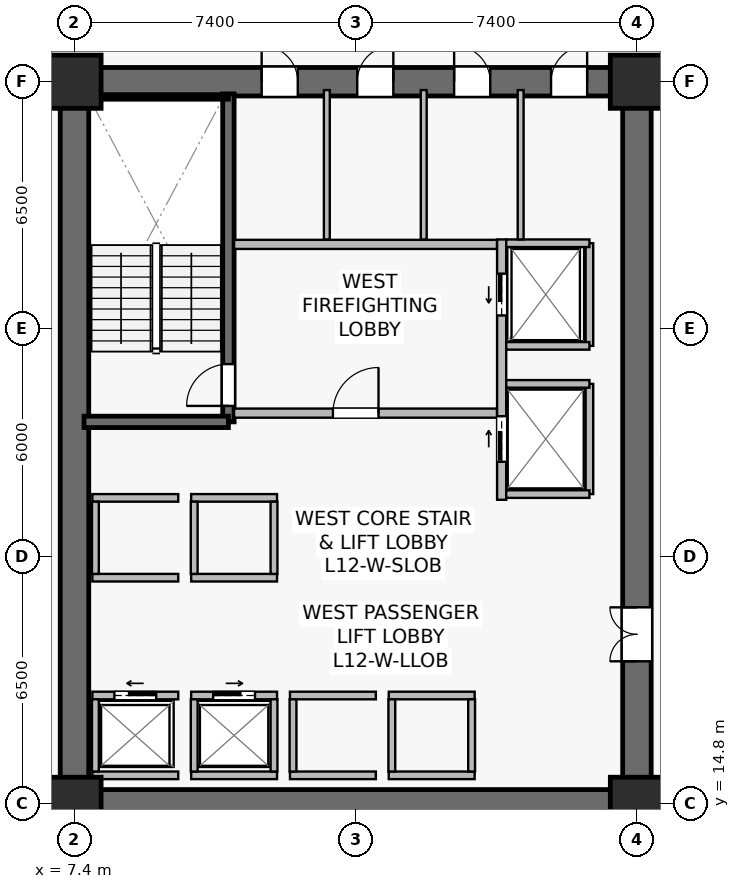
"""IFC4 building model, lengths in metres.
Left out: names, types, materials, properties, quantities, classifications, styles, units other than length and angle.
Written with IfcOpenShell. Run it as: python <this file> out.ifc"""

import sys

from ifc_helpers import new_model, si_unit, direction, frame, frame_2d, origin, origin_2d, place, context, subcontext, project, spatial, rectangle, extrude, source, transform, mapped, element, fill, save


model = new_model("IFC4")
c1 = context("Model", 3, precision=1e-05, world=origin(), true_north=direction((0.0, 1.0)))
c2 = subcontext(c1, "Body", "Model", "MODEL_VIEW")
j1 = project(units=[si_unit("LENGTHUNIT", "METRE"), si_unit("PLANEANGLEUNIT", "RADIAN")], contexts=[c1])
p1 = place(None, origin())
s1 = spatial("IfcSite", under=j1, at=p1, CompositionType="ELEMENT")
p2 = place(p1, origin())
s2 = spatial("IfcBuilding", under=s1, at=p2, CompositionType="ELEMENT")
p3 = place(p2, frame((0.0, 0.0, 49.8)))
s3 = spatial("IfcBuildingStorey", under=s2, at=p3, CompositionType="ELEMENT", Elevation=49.8)
p4 = place(p3, frame((7.025, 14.8, 0.0), z_axis=(0.0, 0.0, 1.0), x_axis=(1.0, 0.0, 0.0)))
e1 = element("IfcWall", 1, at=p4, inside=s3, PredefinedType="SHEAR", context=c2, shape_type="SweptSolid", body=[
    extrude(rectangle(XDim=15.55, YDim=0.75, at=frame_2d((7.775, 0.0))), origin(), (0.0, 0.0, 1.0), 3.78),
])
p5 = place(p3, frame((7.025, 33.8, 0.0), z_axis=(0.0, 0.0, 1.0), x_axis=(1.0, 0.0, 0.0)))
e2 = element("IfcWall", 2, at=p5, inside=s3, PredefinedType="SHEAR", context=c2, shape_type="SweptSolid", body=[
    extrude(rectangle(XDim=15.55, YDim=0.75, at=frame_2d((7.775, 0.0))), origin(), (0.0, 0.0, 1.0), 3.78),
])
p6 = place(p5, frame((5.3, 0.0, 0.0)))
e3 = element("IfcOpeningElement", 3, at=p6, cuts=e2, PredefinedType="OPENING", context=c2, shape_type="SweptSolid", body=[
    extrude(rectangle(XDim=0.95, YDim=2.15, at=frame_2d((0.475, 1.075))), frame((0.0, 0.385, 0.0), z_axis=(0.0, -1.0, 0.0), x_axis=(1.0, 0.0, 0.0)), (0.0, 0.0, 1.0), 0.77),
])
p7 = place(p5, frame((7.815, 0.0, 0.0)))
e4 = element("IfcOpeningElement", 4, at=p7, cuts=e2, PredefinedType="OPENING", context=c2, shape_type="SweptSolid", body=[
    extrude(rectangle(XDim=0.95, YDim=2.15, at=frame_2d((0.475, 1.075))), frame((0.0, 0.385, 0.0), z_axis=(0.0, -1.0, 0.0), x_axis=(1.0, 0.0, 0.0)), (0.0, 0.0, 1.0), 0.77),
])
p8 = place(p5, frame((10.365, 0.0, 0.0)))
e5 = element("IfcOpeningElement", 5, at=p8, cuts=e2, PredefinedType="OPENING", context=c2, shape_type="SweptSolid", body=[
    extrude(rectangle(XDim=0.95, YDim=2.15, at=frame_2d((0.475, 1.075))), frame((0.0, 0.385, 0.0), z_axis=(0.0, -1.0, 0.0), x_axis=(1.0, 0.0, 0.0)), (0.0, 0.0, 1.0), 0.77),
])
p9 = place(p5, frame((12.915, 0.0, 0.0)))
e6 = element("IfcOpeningElement", 6, at=p9, cuts=e2, PredefinedType="OPENING", context=c2, shape_type="SweptSolid", body=[
    extrude(rectangle(XDim=0.95, YDim=2.15, at=frame_2d((0.475, 1.075))), frame((0.0, 0.385, 0.0), z_axis=(0.0, -1.0, 0.0), x_axis=(1.0, 0.0, 0.0)), (0.0, 0.0, 1.0), 0.77),
])
p10 = place(p3, frame((7.4, 15.175, 0.0), z_axis=(0.0, 0.0, 1.0), x_axis=(0.0, 1.0, 0.0)))
e7 = element("IfcWall", 7, at=p10, inside=s3, PredefinedType="SHEAR", context=c2, shape_type="SweptSolid", body=[
    extrude(rectangle(XDim=18.25, YDim=0.75, at=frame_2d((9.125, 0.0))), origin(), (0.0, 0.0, 1.0), 3.78),
])
p11 = place(p3, frame((22.2, 15.175, 0.0), z_axis=(0.0, 0.0, 1.0), x_axis=(0.0, 1.0, 0.0)))
e8 = element("IfcWall", 8, at=p11, inside=s3, PredefinedType="SHEAR", context=c2, shape_type="SweptSolid", body=[
    extrude(rectangle(XDim=18.25, YDim=0.75, at=frame_2d((9.125, 0.0))), origin(), (0.0, 0.0, 1.0), 3.78),
])
p12 = place(p11, frame((3.375, 0.0, 0.0)))
e9 = element("IfcOpeningElement", 9, at=p12, cuts=e8, PredefinedType="OPENING", context=c2, shape_type="SweptSolid", body=[
    extrude(rectangle(XDim=1.42, YDim=2.2, at=frame_2d((0.71, 1.1))), frame((0.0, 0.385, 0.0), z_axis=(0.0, -1.0, 0.0), x_axis=(1.0, 0.0, 0.0)), (0.0, 0.0, 1.0), 0.77),
])
p13 = place(p3, frame((11.45, 24.85, 0.0), z_axis=(0.0, 0.0, 1.0), x_axis=(0.0, 1.0, 0.0)))
e10 = element("IfcWall", 10, at=p13, inside=s3, PredefinedType="SHEAR", context=c2, shape_type="SweptSolid", body=[
    extrude(rectangle(XDim=8.63, YDim=0.3, at=frame_2d((4.315, 0.0))), origin(), (0.0, 0.0, 1.0), 3.78),
])
p14 = place(p13, frame((0.42, 0.0, 0.0)))
e11 = element("IfcOpeningElement", 11, at=p14, cuts=e10, PredefinedType="OPENING", context=c2, shape_type="SweptSolid", body=[
    extrude(rectangle(XDim=1.1, YDim=2.15, at=frame_2d((0.55, 1.075))), frame((0.0, 0.16, 0.0), z_axis=(0.0, -1.0, 0.0), x_axis=(1.0, 0.0, 0.0)), (0.0, 0.0, 1.0), 0.32),
])
p15 = place(p3, frame((7.65, 24.85, 0.0), z_axis=(0.0, 0.0, 1.0), x_axis=(1.0, 0.0, 0.0)))
e12 = element("IfcWall", 12, at=p15, inside=s3, PredefinedType="SHEAR", context=c2, shape_type="SweptSolid", body=[
    extrude(rectangle(XDim=3.8, YDim=0.3, at=frame_2d((1.9, 0.0))), origin(), (0.0, 0.0, 1.0), 3.78),
])
p16 = place(p3, frame((7.73, 33.4, 0.0), z_axis=(0.0, 0.0, 1.0), x_axis=(1.0, 0.0, 0.0)))
e13 = element("IfcWall", 13, at=p16, inside=s3, PredefinedType="SOLIDWALL", context=c2, shape_type="SweptSolid", body=[
    extrude(rectangle(XDim=3.72, YDim=0.12, at=frame_2d((1.86, 0.0))), origin(), (0.0, 0.0, 1.0), 3.78),
])
m1 = source(origin(), c2, "Body", "SweptSolid", [
    extrude(rectangle(XDim=1.4, YDim=1.4, at=origin_2d()), origin(), (0.0, 0.0, 1.0), 4.1),
])
for number, where, z_axis, x_axis in (
    (14, (7.4, 14.8, 0.0), (0.0, 0.0, 1.0), (1.0, 0.0, 0.0)),
    (15, (22.2, 14.8, 0.0), (0.0, 0.0, 1.0), (1.0, 0.0, 0.0)),
    (16, (7.4, 33.8, 0.0), (0.0, 0.0, 1.0), (1.0, 0.0, 0.0)),
    (17, (22.2, 33.8, 0.0), (0.0, 0.0, 1.0), (1.0, 0.0, 0.0)),
):
    element("IfcColumn", number, at=place(p3, frame(where, z_axis=z_axis, x_axis=x_axis)), inside=s3, PredefinedType="COLUMN", context=c2, shape_type="MappedRepresentation", body=[
        mapped(m1, transform((0.0, 0.0, 0.0), scale=1.0)),
    ])
p17 = place(p3, frame((11.6, 25.08, 0.0), z_axis=(0.0, 0.0, 1.0), x_axis=(1.0, 0.0, 0.0)))
e18 = element("IfcWall", 18, at=p17, inside=s3, PredefinedType="SOLIDWALL", context=c2, shape_type="SweptSolid", body=[
    extrude(rectangle(XDim=6.92, YDim=0.24, at=frame_2d((3.46, 0.0))), origin(), (0.0, 0.0, 1.0), 3.065),
])
p18 = place(p17, frame((2.6, 0.0, 0.0)))
e19 = element("IfcOpeningElement", 19, at=p18, cuts=e18, PredefinedType="OPENING", context=c2, shape_type="SweptSolid", body=[
    extrude(rectangle(XDim=1.2, YDim=2.16, at=frame_2d((0.6, 1.08))), frame((0.0, 0.13, 0.0), z_axis=(0.0, -1.0, 0.0), x_axis=(1.0, 0.0, 0.0)), (0.0, 0.0, 1.0), 0.26),
])
p19 = place(p3, frame((11.6, 29.52, 0.0), z_axis=(0.0, 0.0, 1.0), x_axis=(1.0, 0.0, 0.0)))
e20 = element("IfcWall", 20, at=p19, inside=s3, PredefinedType="SOLIDWALL", context=c2, shape_type="SweptSolid", body=[
    extrude(rectangle(XDim=6.92, YDim=0.24, at=frame_2d((3.46, 0.0))), origin(), (0.0, 0.0, 1.0), 3.065),
])
p20 = place(p3, frame((18.64, 22.8, 0.0), z_axis=(0.0, 0.0, 1.0), x_axis=(0.0, 1.0, 0.0)))
e21 = element("IfcWall", 21, at=p20, inside=s3, PredefinedType="SOLIDWALL", context=c2, shape_type="SweptSolid", body=[
    extrude(rectangle(XDim=6.85, YDim=0.24, at=frame_2d((3.425, 0.0))), origin(), (0.0, 0.0, 1.0), 2.865),
])
p21 = place(p20, frame((4.85, 0.0, 0.0)))
e22 = element("IfcOpeningElement", 22, at=p21, cuts=e21, PredefinedType="OPENING", context=c2, shape_type="SweptSolid", body=[
    extrude(rectangle(XDim=1.1, YDim=2.22, at=frame_2d((0.55, 1.11))), frame((0.0, 0.13, 0.0), z_axis=(0.0, -1.0, 0.0), x_axis=(1.0, 0.0, 0.0)), (0.0, 0.0, 1.0), 0.26),
])
p22 = place(p20, frame((1.0, 0.0, 0.0)))
e23 = element("IfcOpeningElement", 23, at=p22, cuts=e21, PredefinedType="OPENING", context=c2, shape_type="SweptSolid", body=[
    extrude(rectangle(XDim=1.2, YDim=2.22, at=frame_2d((0.6, 1.11))), frame((0.0, 0.13, 0.0), z_axis=(0.0, -1.0, 0.0), x_axis=(1.0, 0.0, 0.0)), (0.0, 0.0, 1.0), 0.26),
])
p23 = place(p3, frame((7.87, 17.65, 0.0), z_axis=(0.0, 0.0, 1.0), x_axis=(1.0, 0.0, 0.0)))
e24 = element("IfcWall", 24, at=p23, inside=s3, PredefinedType="SOLIDWALL", context=c2, shape_type="SweptSolid", body=[
    extrude(rectangle(XDim=2.26, YDim=0.2, at=frame_2d((1.13, 0.0))), origin(), (0.0, 0.0, 1.0), 3.78),
])
p24 = place(p23, frame((0.58, 0.0, 0.0)))
e25 = element("IfcOpeningElement", 25, at=p24, cuts=e24, PredefinedType="OPENING", context=c2, shape_type="SweptSolid", body=[
    extrude(rectangle(XDim=1.1, YDim=2.22, at=frame_2d((0.55, 1.11))), frame((0.0, 0.11, 0.0), z_axis=(0.0, -1.0, 0.0), x_axis=(1.0, 0.0, 0.0)), (0.0, 0.0, 1.0), 0.22),
])
p25 = place(p3, frame((7.87, 15.55, 0.0), z_axis=(0.0, 0.0, 1.0), x_axis=(1.0, 0.0, 0.0)))
e26 = element("IfcWall", 26, at=p25, inside=s3, PredefinedType="SOLIDWALL", context=c2, shape_type="SweptSolid", body=[
    extrude(rectangle(XDim=2.26, YDim=0.2, at=frame_2d((1.13, 0.0))), origin(), (0.0, 0.0, 1.0), 3.78),
])
p26 = place(p3, frame((7.95, 15.65, 0.0), z_axis=(0.0, 0.0, 1.0), x_axis=(0.0, 1.0, 0.0)))
e27 = element("IfcWall", 27, at=p26, inside=s3, PredefinedType="SOLIDWALL", context=c2, shape_type="SweptSolid", body=[
    extrude(rectangle(XDim=1.9, YDim=0.18, at=frame_2d((0.95, 0.0))), origin(), (0.0, 0.0, 1.0), 3.78),
])
p27 = place(p3, frame((10.47, 17.65, 0.0), z_axis=(0.0, 0.0, 1.0), x_axis=(1.0, 0.0, 0.0)))
e28 = element("IfcWall", 28, at=p27, inside=s3, PredefinedType="SOLIDWALL", context=c2, shape_type="SweptSolid", body=[
    extrude(rectangle(XDim=2.26, YDim=0.2, at=frame_2d((1.13, 0.0))), origin(), (0.0, 0.0, 1.0), 3.78),
])
p28 = place(p27, frame((0.58, 0.0, 0.0)))
e29 = element("IfcOpeningElement", 29, at=p28, cuts=e28, PredefinedType="OPENING", context=c2, shape_type="SweptSolid", body=[
    extrude(rectangle(XDim=1.1, YDim=2.22, at=frame_2d((0.55, 1.11))), frame((0.0, 0.11, 0.0), z_axis=(0.0, -1.0, 0.0), x_axis=(1.0, 0.0, 0.0)), (0.0, 0.0, 1.0), 0.22),
])
p29 = place(p3, frame((10.47, 15.55, 0.0), z_axis=(0.0, 0.0, 1.0), x_axis=(1.0, 0.0, 0.0)))
e30 = element("IfcWall", 30, at=p29, inside=s3, PredefinedType="SOLIDWALL", context=c2, shape_type="SweptSolid", body=[
    extrude(rectangle(XDim=2.26, YDim=0.2, at=frame_2d((1.13, 0.0))), origin(), (0.0, 0.0, 1.0), 3.78),
])
for number, where, z_axis, x_axis in (
    (31, (10.55, 15.65, 0.0), (0.0, 0.0, 1.0), (0.0, 1.0, 0.0)),
    (32, (12.65, 15.65, 0.0), (0.0, 0.0, 1.0), (0.0, 1.0, 0.0)),
):
    element("IfcWall", number, at=place(p3, frame(where, z_axis=z_axis, x_axis=x_axis)), inside=s3, PredefinedType="SOLIDWALL", context=c2, shape_type="SweptSolid", body=[
        extrude(rectangle(XDim=1.9, YDim=0.18, at=frame_2d((0.95, 0.0))), origin(), (0.0, 0.0, 1.0), 3.78),
    ])
for number, where, z_axis, x_axis in (
    (33, (13.07, 17.65, 0.0), (0.0, 0.0, 1.0), (1.0, 0.0, 0.0)),
    (34, (13.07, 15.55, 0.0), (0.0, 0.0, 1.0), (1.0, 0.0, 0.0)),
):
    element("IfcWall", number, at=place(p3, frame(where, z_axis=z_axis, x_axis=x_axis)), inside=s3, PredefinedType="SOLIDWALL", context=c2, shape_type="SweptSolid", body=[
        extrude(rectangle(XDim=2.26, YDim=0.2, at=frame_2d((1.13, 0.0))), origin(), (0.0, 0.0, 1.0), 3.065),
    ])
p30 = place(p3, frame((13.15, 15.65, 0.0), z_axis=(0.0, 0.0, 1.0), x_axis=(0.0, 1.0, 0.0)))
e35 = element("IfcWall", 35, at=p30, inside=s3, PredefinedType="SOLIDWALL", context=c2, shape_type="SweptSolid", body=[
    extrude(rectangle(XDim=1.9, YDim=0.18, at=frame_2d((0.95, 0.0))), origin(), (0.0, 0.0, 1.0), 3.78),
])
for number, where, z_axis, x_axis in (
    (36, (15.67, 17.65, 0.0), (0.0, 0.0, 1.0), (1.0, 0.0, 0.0)),
    (37, (15.67, 15.55, 0.0), (0.0, 0.0, 1.0), (1.0, 0.0, 0.0)),
):
    element("IfcWall", number, at=place(p3, frame(where, z_axis=z_axis, x_axis=x_axis)), inside=s3, PredefinedType="SOLIDWALL", context=c2, shape_type="SweptSolid", body=[
        extrude(rectangle(XDim=2.26, YDim=0.2, at=frame_2d((1.13, 0.0))), origin(), (0.0, 0.0, 1.0), 3.78),
    ])
for number, where, z_axis, x_axis in (
    (38, (15.75, 15.65, 0.0), (0.0, 0.0, 1.0), (0.0, 1.0, 0.0)),
    (39, (17.85, 15.65, 0.0), (0.0, 0.0, 1.0), (0.0, 1.0, 0.0)),
):
    element("IfcWall", number, at=place(p3, frame(where, z_axis=z_axis, x_axis=x_axis)), inside=s3, PredefinedType="SOLIDWALL", context=c2, shape_type="SweptSolid", body=[
        extrude(rectangle(XDim=1.9, YDim=0.18, at=frame_2d((0.95, 0.0))), origin(), (0.0, 0.0, 1.0), 3.78),
    ])
for number, where, z_axis, x_axis in (
    (40, (7.87, 20.75, 0.0), (0.0, 0.0, 1.0), (1.0, 0.0, 0.0)),
    (41, (7.87, 22.85, 0.0), (0.0, 0.0, 1.0), (1.0, 0.0, 0.0)),
):
    element("IfcWall", number, at=place(p3, frame(where, z_axis=z_axis, x_axis=x_axis)), inside=s3, PredefinedType="SOLIDWALL", context=c2, shape_type="SweptSolid", body=[
        extrude(rectangle(XDim=2.26, YDim=0.2, at=frame_2d((1.13, 0.0))), origin(), (0.0, 0.0, 1.0), 3.78),
    ])
p31 = place(p3, frame((7.95, 20.85, 0.0), z_axis=(0.0, 0.0, 1.0), x_axis=(0.0, 1.0, 0.0)))
e42 = element("IfcWall", 42, at=p31, inside=s3, PredefinedType="SOLIDWALL", context=c2, shape_type="SweptSolid", body=[
    extrude(rectangle(XDim=1.9, YDim=0.18, at=frame_2d((0.95, 0.0))), origin(), (0.0, 0.0, 1.0), 3.78),
])
for number, where, z_axis, x_axis in (
    (43, (10.47, 20.75, 0.0), (0.0, 0.0, 1.0), (1.0, 0.0, 0.0)),
    (44, (10.47, 22.85, 0.0), (0.0, 0.0, 1.0), (1.0, 0.0, 0.0)),
):
    element("IfcWall", number, at=place(p3, frame(where, z_axis=z_axis, x_axis=x_axis)), inside=s3, PredefinedType="SOLIDWALL", context=c2, shape_type="SweptSolid", body=[
        extrude(rectangle(XDim=2.26, YDim=0.2, at=frame_2d((1.13, 0.0))), origin(), (0.0, 0.0, 1.0), 3.78),
    ])
for number, where, z_axis, x_axis in (
    (45, (10.55, 20.85, 0.0), (0.0, 0.0, 1.0), (0.0, 1.0, 0.0)),
    (46, (12.65, 20.85, 0.0), (0.0, 0.0, 1.0), (0.0, 1.0, 0.0)),
):
    element("IfcWall", number, at=place(p3, frame(where, z_axis=z_axis, x_axis=x_axis)), inside=s3, PredefinedType="SOLIDWALL", context=c2, shape_type="SweptSolid", body=[
        extrude(rectangle(XDim=1.9, YDim=0.18, at=frame_2d((0.95, 0.0))), origin(), (0.0, 0.0, 1.0), 3.78),
    ])
p32 = place(p3, frame((20.95, 26.85, 0.0), z_axis=(0.0, 0.0, 1.0), x_axis=(0.0, 1.0, 0.0)))
e47 = element("IfcWall", 47, at=p32, inside=s3, PredefinedType="SOLIDWALL", context=c2, shape_type="SweptSolid", body=[
    extrude(rectangle(XDim=2.7, YDim=0.2, at=frame_2d((1.35, 0.0))), origin(), (0.0, 0.0, 1.0), 3.78),
])
p33 = place(p3, frame((18.76, 29.55, 0.0), z_axis=(0.0, 0.0, 1.0), x_axis=(1.0, 0.0, 0.0)))
e48 = element("IfcWall", 48, at=p33, inside=s3, PredefinedType="SOLIDWALL", context=c2, shape_type="SweptSolid", body=[
    extrude(rectangle(XDim=2.19, YDim=0.2, at=frame_2d((1.095, 0.0))), origin(), (0.0, 0.0, 1.0), 3.78),
])
p34 = place(p3, frame((18.76, 26.85, 0.0), z_axis=(0.0, 0.0, 1.0), x_axis=(1.0, 0.0, 0.0)))
e49 = element("IfcWall", 49, at=p34, inside=s3, PredefinedType="SOLIDWALL", context=c2, shape_type="SweptSolid", body=[
    extrude(rectangle(XDim=2.19, YDim=0.2, at=frame_2d((1.095, 0.0))), origin(), (0.0, 0.0, 1.0), 3.177),
])
p35 = place(p3, frame((20.95, 22.95, 0.0), z_axis=(0.0, 0.0, 1.0), x_axis=(0.0, 1.0, 0.0)))
e50 = element("IfcWall", 50, at=p35, inside=s3, PredefinedType="SOLIDWALL", context=c2, shape_type="SweptSolid", body=[
    extrude(rectangle(XDim=2.9, YDim=0.2, at=frame_2d((1.45, 0.0))), origin(), (0.0, 0.0, 1.0), 2.865),
])
for number, where, z_axis, x_axis in (
    (51, (18.76, 25.85, 0.0), (0.0, 0.0, 1.0), (1.0, 0.0, 0.0)),
    (52, (18.76, 22.95, 0.0), (0.0, 0.0, 1.0), (1.0, 0.0, 0.0)),
):
    element("IfcWall", number, at=place(p3, frame(where, z_axis=z_axis, x_axis=x_axis)), inside=s3, PredefinedType="SOLIDWALL", context=c2, shape_type="SweptSolid", body=[
        extrude(rectangle(XDim=2.19, YDim=0.2, at=frame_2d((1.095, 0.0))), origin(), (0.0, 0.0, 1.0), 3.78),
    ])
for number, where, z_axis, x_axis in (
    (53, (14.04, 29.65, 0.0), (0.0, 0.0, 1.0), (0.0, 1.0, 0.0)),
    (54, (16.59, 29.65, 0.0), (0.0, 0.0, 1.0), (0.0, 1.0, 0.0)),
    (55, (19.14, 29.65, 0.0), (0.0, 0.0, 1.0), (0.0, 1.0, 0.0)),
):
    element("IfcWall", number, at=place(p3, frame(where, z_axis=z_axis, x_axis=x_axis)), inside=s3, PredefinedType="PLUMBINGWALL", context=c2, shape_type="SweptSolid", body=[
        extrude(rectangle(XDim=3.93, YDim=0.155, at=frame_2d((1.965, 0.0))), origin(), (0.0, 0.0, 1.0), 3.78),
    ])
m2 = source(origin(), c2, "Body", "SweptSolid", [
    extrude(rectangle(XDim=1.1, YDim=2.15, at=frame_2d((0.55, 1.075))), frame((0.0, 0.025, 0.0), z_axis=(0.0, -1.0, 0.0), x_axis=(1.0, 0.0, 0.0)), (0.0, 0.0, 1.0), 0.05),
])
p36 = place(p14, origin())
e56 = element("IfcDoor", 56, at=p36, inside=s3, OperationType="SINGLE_SWING_LEFT", PredefinedType="DOOR", context=c2, shape_type="MappedRepresentation", body=[
    mapped(m2, transform((0.0, 0.0, 0.0), scale=1.0)),
])
fill(e11, e56)
m3 = source(origin(), c2, "Body", "SweptSolid", [
    extrude(rectangle(XDim=1.2, YDim=2.16, at=frame_2d((0.6, 1.08))), frame((0.0, 0.025, 0.0), z_axis=(0.0, -1.0, 0.0), x_axis=(1.0, 0.0, 0.0)), (0.0, 0.0, 1.0), 0.05),
])
p37 = place(p18, origin())
e57 = element("IfcDoor", 57, at=p37, inside=s3, OperationType="SINGLE_SWING_RIGHT", PredefinedType="DOOR", context=c2, shape_type="MappedRepresentation", body=[
    mapped(m3, transform((0.0, 0.0, 0.0), scale=1.0)),
])
fill(e19, e57)
m4 = source(origin(), c2, "Body", "SweptSolid", [
    extrude(rectangle(XDim=1.1, YDim=2.22, at=frame_2d((0.55, 1.11))), frame((0.0, 0.025, 0.0), z_axis=(0.0, -1.0, 0.0), x_axis=(1.0, 0.0, 0.0)), (0.0, 0.0, 1.0), 0.05),
])
p38 = place(p24, origin())
e58 = element("IfcDoor", 58, at=p38, inside=s3, OperationType="SLIDING_TO_LEFT", PredefinedType="USERDEFINED", context=c2, shape_type="MappedRepresentation", body=[
    mapped(m4, transform((0.0, 0.0, 0.0), scale=1.0)),
])
fill(e25, e58)
p39 = place(p28, origin())
e59 = element("IfcDoor", 59, at=p39, inside=s3, OperationType="SLIDING_TO_RIGHT", PredefinedType="USERDEFINED", context=c2, shape_type="MappedRepresentation", body=[
    mapped(m4, transform((0.0, 0.0, 0.0), scale=1.0)),
])
fill(e29, e59)
p40 = place(p21, origin())
e60 = element("IfcDoor", 60, at=p40, inside=s3, OperationType="SLIDING_TO_LEFT", PredefinedType="USERDEFINED", context=c2, shape_type="MappedRepresentation", body=[
    mapped(m4, transform((0.0, 0.0, 0.0), scale=1.0)),
])
fill(e22, e60)
m5 = source(origin(), c2, "Body", "SweptSolid", [
    extrude(rectangle(XDim=1.2, YDim=2.22, at=frame_2d((0.6, 1.11))), frame((0.0, 0.025, 0.0), z_axis=(0.0, -1.0, 0.0), x_axis=(1.0, 0.0, 0.0)), (0.0, 0.0, 1.0), 0.05),
])
p41 = place(p22, origin())
e61 = element("IfcDoor", 61, at=p41, inside=s3, OperationType="SLIDING_TO_RIGHT", PredefinedType="USERDEFINED", context=c2, shape_type="MappedRepresentation", body=[
    mapped(m5, transform((0.0, 0.0, 0.0), scale=1.0)),
])
fill(e23, e61)
m6 = source(origin(), c2, "Body", "SweptSolid", [
    extrude(rectangle(XDim=1.42, YDim=2.2, at=frame_2d((0.71, 1.1))), frame((0.0, 0.025, 0.0), z_axis=(0.0, -1.0, 0.0), x_axis=(1.0, 0.0, 0.0)), (0.0, 0.0, 1.0), 0.05),
])
p42 = place(p12, origin())
e62 = element("IfcDoor", 62, at=p42, inside=s3, OperationType="DOUBLE_DOOR_SINGLE_SWING", PredefinedType="DOOR", context=c2, shape_type="MappedRepresentation", body=[
    mapped(m6, transform((0.0, 0.0, 0.0), scale=1.0)),
])
fill(e9, e62)
m7 = source(origin(), c2, "Body", "SweptSolid", [
    extrude(rectangle(XDim=0.95, YDim=2.15, at=frame_2d((0.475, 1.075))), frame((0.0, 0.025, 0.0), z_axis=(0.0, -1.0, 0.0), x_axis=(1.0, 0.0, 0.0)), (0.0, 0.0, 1.0), 0.05),
])
p43 = place(p6, origin())
e63 = element("IfcDoor", 63, at=p43, inside=s3, OperationType="SINGLE_SWING_LEFT", PredefinedType="DOOR", context=c2, shape_type="MappedRepresentation", body=[
    mapped(m7, transform((0.0, 0.0, 0.0), scale=1.0)),
])
fill(e3, e63)
p44 = place(p7, origin())
e64 = element("IfcDoor", 64, at=p44, inside=s3, OperationType="SINGLE_SWING_RIGHT", PredefinedType="DOOR", context=c2, shape_type="MappedRepresentation", body=[
    mapped(m7, transform((0.0, 0.0, 0.0), scale=1.0)),
])
fill(e4, e64)
p45 = place(p8, origin())
e65 = element("IfcDoor", 65, at=p45, inside=s3, OperationType="SINGLE_SWING_LEFT", PredefinedType="DOOR", context=c2, shape_type="MappedRepresentation", body=[
    mapped(m7, transform((0.0, 0.0, 0.0), scale=1.0)),
])
fill(e5, e65)
p46 = place(p9, origin())
e66 = element("IfcDoor", 66, at=p46, inside=s3, OperationType="SINGLE_SWING_RIGHT", PredefinedType="DOOR", context=c2, shape_type="MappedRepresentation", body=[
    mapped(m7, transform((0.0, 0.0, 0.0), scale=1.0)),
])
fill(e6, e66)
save(model, sys.argv[1])
